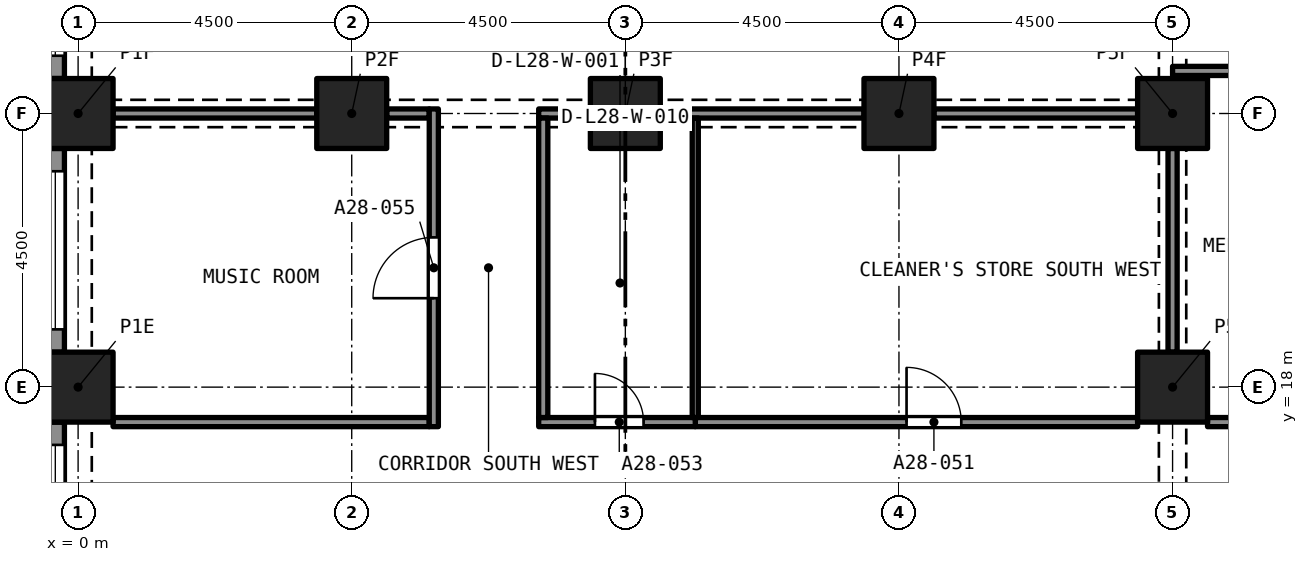
"""IFC4 building model, lengths in metres.
Left out: names, types, materials, properties, quantities, classifications, styles, units other than length and angle.
Written with IfcOpenShell. Run it as: python <this file> out.ifc"""

import sys

from ifc_helpers import new_model, si_unit, direction, frame, frame_2d, origin, origin_2d, place, context, subcontext, project, spatial, rectangle, extrude, element, fill, save


model = new_model("IFC4")
c1 = context("Model", 3, precision=1e-05, world=origin(), true_north=direction((0.0, 1.0)))
c2 = subcontext(c1, "Body", "Model", "MODEL_VIEW")
j1 = project(units=[si_unit("LENGTHUNIT", "METRE"), si_unit("PLANEANGLEUNIT", "RADIAN")], contexts=[c1])
p1 = place(None, origin())
s1 = spatial("IfcSite", under=j1, at=p1, CompositionType="ELEMENT")
p2 = place(p1, origin())
s2 = spatial("IfcBuilding", under=s1, at=p2, CompositionType="ELEMENT")
p3 = place(p2, frame((0.0, 0.0, 102.4)))
s3 = spatial("IfcBuildingStorey", under=s2, at=p3, CompositionType="ELEMENT", Elevation=102.4)
for number, where, z_axis, x_axis in (
    (1, (0.0, 18.0, 0.0), (0.0, 0.0, 1.0), (1.0, 0.0, 0.0)),
    (2, (18.0, 18.0, 0.0), (0.0, 0.0, 1.0), (1.0, 0.0, 0.0)),
    (3, (0.0, 22.5, 0.0), (0.0, 0.0, 1.0), (1.0, 0.0, 0.0)),
    (4, (4.5, 22.5, 0.0), (0.0, 0.0, 1.0), (1.0, 0.0, 0.0)),
    (5, (9.0, 22.5, 0.0), (0.0, 0.0, 1.0), (1.0, 0.0, 0.0)),
    (6, (13.5, 22.5, 0.0), (0.0, 0.0, 1.0), (1.0, 0.0, 0.0)),
    (7, (18.0, 22.5, 0.0), (0.0, 0.0, 1.0), (1.0, 0.0, 0.0)),
):
    element("IfcColumn", number, at=place(p3, frame(where, z_axis=z_axis, x_axis=x_axis)), inside=s3, PredefinedType="COLUMN", context=c2, shape_type="SweptSolid", body=[
        extrude(rectangle(XDim=1.15, YDim=1.15, at=origin_2d()), origin(), (0.0, 0.0, 1.0), 3.2),
    ])
p4 = place(p3, frame((-0.375, 23.075, 0.0), z_axis=(0.0, 0.0, 1.0), x_axis=(0.0, 1.0, 0.0)))
e8 = element("IfcWall", 8, at=p4, inside=s3, PredefinedType="SOLIDWALL", context=c2, shape_type="SweptSolid", body=[
    extrude(rectangle(XDim=3.35, YDim=0.3, at=frame_2d((1.675, 0.0))), origin(), (0.0, 0.0, 1.0), 3.2),
])
p5 = place(p4, frame((0.375, 0.0, 0.45)))
e9 = element("IfcOpeningElement", 9, at=p5, cuts=e8, PredefinedType="OPENING", context=c2, shape_type="SweptSolid", body=[
    extrude(rectangle(XDim=2.6, YDim=1.95, at=frame_2d((1.3, 0.975))), frame((0.0, 0.16, 0.0), z_axis=(0.0, -1.0, 0.0), x_axis=(1.0, 0.0, 0.0)), (0.0, 0.0, 1.0), 0.32),
])
p6 = place(p3, frame((-0.375, 18.575, 0.0), z_axis=(0.0, 0.0, 1.0), x_axis=(0.0, 1.0, 0.0)))
e10 = element("IfcWall", 10, at=p6, inside=s3, PredefinedType="SOLIDWALL", context=c2, shape_type="SweptSolid", body=[
    extrude(rectangle(XDim=3.35, YDim=0.3, at=frame_2d((1.675, 0.0))), origin(), (0.0, 0.0, 1.0), 3.2),
])
p7 = place(p6, frame((0.375, 0.0, 0.45)))
e11 = element("IfcOpeningElement", 11, at=p7, cuts=e10, PredefinedType="OPENING", context=c2, shape_type="SweptSolid", body=[
    extrude(rectangle(XDim=2.6, YDim=1.95, at=frame_2d((1.3, 0.975))), frame((0.0, 0.16, 0.0), z_axis=(0.0, -1.0, 0.0), x_axis=(1.0, 0.0, 0.0)), (0.0, 0.0, 1.0), 0.32),
])
p8 = place(p3, frame((-0.375, 14.075, 0.0), z_axis=(0.0, 0.0, 1.0), x_axis=(0.0, 1.0, 0.0)))
e12 = element("IfcWall", 12, at=p8, inside=s3, PredefinedType="SOLIDWALL", context=c2, shape_type="SweptSolid", body=[
    extrude(rectangle(XDim=3.35, YDim=0.3, at=frame_2d((1.675, 0.0))), origin(), (0.0, 0.0, 1.0), 3.2),
])
p9 = place(p8, frame((0.375, 0.0, 0.45)))
e13 = element("IfcOpeningElement", 13, at=p9, cuts=e12, PredefinedType="OPENING", context=c2, shape_type="SweptSolid", body=[
    extrude(rectangle(XDim=2.6, YDim=1.95, at=frame_2d((1.3, 0.975))), frame((0.0, 0.16, 0.0), z_axis=(0.0, -1.0, 0.0), x_axis=(1.0, 0.0, 0.0)), (0.0, 0.0, 1.0), 0.32),
])
p10 = place(p3, frame((18.575, 17.425, 0.0), z_axis=(0.0, 0.0, 1.0), x_axis=(1.0, 0.0, 0.0)))
e14 = element("IfcWall", 14, at=p10, inside=s3, PredefinedType="PARTITIONING", context=c2, shape_type="SweptSolid", body=[
    extrude(rectangle(XDim=5.2, YDim=0.15, at=frame_2d((2.6, 0.0))), origin(), (0.0, 0.0, 1.0), 2.75),
])
p11 = place(p3, frame((10.15, 17.425, 0.0), z_axis=(0.0, 0.0, 1.0), x_axis=(1.0, 0.0, 0.0)))
e15 = element("IfcWall", 15, at=p11, inside=s3, PredefinedType="PARTITIONING", context=c2, shape_type="SweptSolid", body=[
    extrude(rectangle(XDim=7.275, YDim=0.15, at=frame_2d((3.638, 0.0))), origin(), (0.0, 0.0, 1.0), 2.9),
])
p12 = place(p11, frame((3.475, 0.0, 0.0)))
e16 = element("IfcOpeningElement", 16, at=p12, cuts=e15, PredefinedType="OPENING", context=c2, shape_type="SweptSolid", body=[
    extrude(rectangle(XDim=0.9, YDim=2.1, at=frame_2d((0.45, 1.05))), frame((0.0, 0.085, 0.0), z_axis=(0.0, -1.0, 0.0), x_axis=(1.0, 0.0, 0.0)), (0.0, 0.0, 1.0), 0.17),
])
p13 = place(p3, frame((7.575, 17.425, 0.0), z_axis=(0.0, 0.0, 1.0), x_axis=(1.0, 0.0, 0.0)))
e17 = element("IfcWall", 17, at=p13, inside=s3, PredefinedType="PARTITIONING", context=c2, shape_type="SweptSolid", body=[
    extrude(rectangle(XDim=2.575, YDim=0.15, at=frame_2d((1.288, 0.0))), origin(), (0.0, 0.0, 1.0), 2.9),
])
p14 = place(p13, frame((0.925, 0.0, 0.0)))
e18 = element("IfcOpeningElement", 18, at=p14, cuts=e17, PredefinedType="OPENING", context=c2, shape_type="SweptSolid", body=[
    extrude(rectangle(XDim=0.8, YDim=2.1, at=frame_2d((0.4, 1.05))), frame((0.0, 0.085, 0.0), z_axis=(0.0, -1.0, 0.0), x_axis=(1.0, 0.0, 0.0)), (0.0, 0.0, 1.0), 0.17),
])
p15 = place(p3, frame((0.575, 17.425, 0.0), z_axis=(0.0, 0.0, 1.0), x_axis=(1.0, 0.0, 0.0)))
e19 = element("IfcWall", 19, at=p15, inside=s3, PredefinedType="PARTITIONING", context=c2, shape_type="SweptSolid", body=[
    extrude(rectangle(XDim=5.2, YDim=0.15, at=frame_2d((2.6, 0.0))), origin(), (0.0, 0.0, 1.0), 2.9),
])
p16 = place(p3, frame((18.0, 23.2, 0.0), z_axis=(0.0, 0.0, 1.0), x_axis=(1.0, 0.0, 0.0)))
e20 = element("IfcWall", 20, at=p16, inside=s3, PredefinedType="PARTITIONING", context=c2, shape_type="SweptSolid", body=[
    extrude(rectangle(XDim=5.775, YDim=0.15, at=frame_2d((2.887, 0.0))), origin(), (0.0, 0.0, 1.0), 2.75),
])
for number, where, z_axis, x_axis in (
    (21, (18.0, 18.575, 0.0), (0.0, 0.0, 1.0), (0.0, 1.0, 0.0)),
    (22, (14.075, 22.5, 0.0), (0.0, 0.0, 1.0), (1.0, 0.0, 0.0)),
    (23, (9.575, 22.5, 0.0), (0.0, 0.0, 1.0), (1.0, 0.0, 0.0)),
):
    element("IfcWall", number, at=place(p3, frame(where, z_axis=z_axis, x_axis=x_axis)), inside=s3, PredefinedType="PARTITIONING", context=c2, shape_type="SweptSolid", body=[
        extrude(rectangle(XDim=3.35, YDim=0.15, at=frame_2d((1.675, 0.0))), origin(), (0.0, 0.0, 1.0), 2.38),
    ])
p17 = place(p3, frame((7.575, 22.5, 0.0), z_axis=(0.0, 0.0, 1.0), x_axis=(1.0, 0.0, 0.0)))
e24 = element("IfcWall", 24, at=p17, inside=s3, PredefinedType="PARTITIONING", context=c2, shape_type="SweptSolid", body=[
    extrude(rectangle(XDim=0.85, YDim=0.15, at=frame_2d((0.425, 0.0))), origin(), (0.0, 0.0, 1.0), 2.38),
])
p18 = place(p3, frame((5.075, 22.5, 0.0), z_axis=(0.0, 0.0, 1.0), x_axis=(1.0, 0.0, 0.0)))
e25 = element("IfcWall", 25, at=p18, inside=s3, PredefinedType="PARTITIONING", context=c2, shape_type="SweptSolid", body=[
    extrude(rectangle(XDim=0.7, YDim=0.15, at=frame_2d((0.35, 0.0))), origin(), (0.0, 0.0, 1.0), 2.38),
])
p19 = place(p3, frame((0.575, 22.5, 0.0), z_axis=(0.0, 0.0, 1.0), x_axis=(1.0, 0.0, 0.0)))
e26 = element("IfcWall", 26, at=p19, inside=s3, PredefinedType="PARTITIONING", context=c2, shape_type="SweptSolid", body=[
    extrude(rectangle(XDim=3.35, YDim=0.15, at=frame_2d((1.675, 0.0))), origin(), (0.0, 0.0, 1.0), 2.38),
])
p20 = place(p3, frame((7.65, 17.5, 0.0), z_axis=(0.0, 0.0, 1.0), x_axis=(0.0, 1.0, 0.0)))
e27 = element("IfcWall", 27, at=p20, inside=s3, PredefinedType="PARTITIONING", context=c2, shape_type="SweptSolid", body=[
    extrude(rectangle(XDim=4.925, YDim=0.15, at=frame_2d((2.462, 0.0))), origin(), (0.0, 0.0, 1.0), 2.9),
])
p21 = place(p3, frame((5.85, 17.35, 0.0), z_axis=(0.0, 0.0, 1.0), x_axis=(0.0, 1.0, 0.0)))
e28 = element("IfcWall", 28, at=p21, inside=s3, PredefinedType="PARTITIONING", context=c2, shape_type="SweptSolid", body=[
    extrude(rectangle(XDim=5.225, YDim=0.15, at=frame_2d((2.612, 0.0))), origin(), (0.0, 0.0, 1.0), 2.9),
])
p22 = place(p21, frame((2.113, 0.0, 0.0)))
e29 = element("IfcOpeningElement", 29, at=p22, cuts=e28, PredefinedType="OPENING", context=c2, shape_type="SweptSolid", body=[
    extrude(rectangle(XDim=1.0, YDim=2.1, at=frame_2d((0.5, 1.05))), frame((0.0, 0.085, 0.0), z_axis=(0.0, -1.0, 0.0), x_axis=(1.0, 0.0, 0.0)), (0.0, 0.0, 1.0), 0.17),
])
p23 = place(p3, frame((10.15, 17.5, 0.0), z_axis=(0.0, 0.0, 1.0), x_axis=(0.0, 1.0, 0.0)))
e30 = element("IfcWall", 30, at=p23, inside=s3, PredefinedType="PARTITIONING", context=c2, shape_type="SweptSolid", body=[
    extrude(rectangle(XDim=4.925, YDim=0.1, at=frame_2d((2.462, 0.0))), origin(), (0.0, 0.0, 1.0), 2.9),
])
p24 = place(p5, origin())
e31 = element("IfcWindow", 31, at=p24, inside=s3, PartitioningType="SINGLE_PANEL", PredefinedType="WINDOW", context=c2, shape_type="SweptSolid", body=[
    extrude(rectangle(XDim=2.6, YDim=1.95, at=frame_2d((1.3, 0.975))), frame((0.0, 0.03, 0.0), z_axis=(0.0, -1.0, 0.0), x_axis=(1.0, 0.0, 0.0)), (0.0, 0.0, 1.0), 0.06),
])
fill(e9, e31)
p25 = place(p7, origin())
e32 = element("IfcWindow", 32, at=p25, inside=s3, PartitioningType="SINGLE_PANEL", PredefinedType="WINDOW", context=c2, shape_type="SweptSolid", body=[
    extrude(rectangle(XDim=2.6, YDim=1.95, at=frame_2d((1.3, 0.975))), frame((0.0, 0.03, 0.0), z_axis=(0.0, -1.0, 0.0), x_axis=(1.0, 0.0, 0.0)), (0.0, 0.0, 1.0), 0.06),
])
fill(e11, e32)
p26 = place(p9, origin())
e33 = element("IfcWindow", 33, at=p26, inside=s3, PartitioningType="SINGLE_PANEL", PredefinedType="WINDOW", context=c2, shape_type="SweptSolid", body=[
    extrude(rectangle(XDim=2.6, YDim=1.95, at=frame_2d((1.3, 0.975))), frame((0.0, 0.03, 0.0), z_axis=(0.0, -1.0, 0.0), x_axis=(1.0, 0.0, 0.0)), (0.0, 0.0, 1.0), 0.06),
])
fill(e13, e33)
p27 = place(p12, origin())
e34 = element("IfcDoor", 34, at=p27, inside=s3, OperationType="SINGLE_SWING_RIGHT", PredefinedType="DOOR", context=c2, shape_type="SweptSolid", body=[
    extrude(rectangle(XDim=0.9, YDim=2.1, at=frame_2d((0.45, 1.05))), frame((0.0, 0.025, 0.0), z_axis=(0.0, -1.0, 0.0), x_axis=(1.0, 0.0, 0.0)), (0.0, 0.0, 1.0), 0.05),
])
fill(e16, e34)
p28 = place(p14, origin())
e35 = element("IfcDoor", 35, at=p28, inside=s3, OperationType="SINGLE_SWING_RIGHT", PredefinedType="DOOR", context=c2, shape_type="SweptSolid", body=[
    extrude(rectangle(XDim=0.8, YDim=2.1, at=frame_2d((0.4, 1.05))), frame((0.0, 0.025, 0.0), z_axis=(0.0, -1.0, 0.0), x_axis=(1.0, 0.0, 0.0)), (0.0, 0.0, 1.0), 0.05),
])
fill(e18, e35)
p29 = place(p22, origin())
e36 = element("IfcDoor", 36, at=p29, inside=s3, OperationType="SINGLE_SWING_LEFT", PredefinedType="DOOR", context=c2, shape_type="SweptSolid", body=[
    extrude(rectangle(XDim=1.0, YDim=2.1, at=frame_2d((0.5, 1.05))), frame((0.0, 0.025, 0.0), z_axis=(0.0, -1.0, 0.0), x_axis=(1.0, 0.0, 0.0)), (0.0, 0.0, 1.0), 0.05),
])
fill(e29, e36)
save(model, sys.argv[1])
